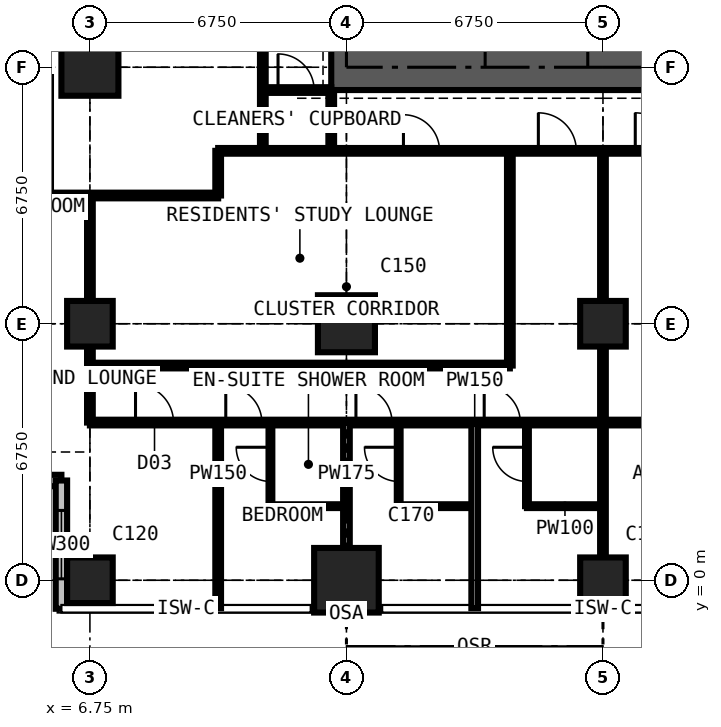
"""IFC4 building model, lengths in metres.
Left out: names, types, materials, properties, quantities, classifications, styles, units other than length and angle.
Written with IfcOpenShell. Run it as: python <this file> out.ifc"""

import sys

from ifc_helpers import new_model, si_unit, direction, frame, frame_2d, origin, origin_2d, place, context, subcontext, project, spatial, rectangle, extrude, element, fill, save


model = new_model("IFC4")
c1 = context("Model", 3, precision=1e-05, world=origin(), true_north=direction((0.0, 1.0)))
c2 = subcontext(c1, "Body", "Model", "MODEL_VIEW")
j1 = project(units=[si_unit("LENGTHUNIT", "METRE"), si_unit("PLANEANGLEUNIT", "RADIAN")], contexts=[c1])
p1 = place(None, origin())
s1 = spatial("IfcSite", under=j1, at=p1, CompositionType="ELEMENT")
p2 = place(p1, origin())
s2 = spatial("IfcBuilding", under=s1, at=p2, CompositionType="ELEMENT")
p3 = place(p2, frame((0.0, 0.0, 196.2)))
s3 = spatial("IfcBuildingStorey", under=s2, at=p3, CompositionType="ELEMENT", Elevation=196.2)
for number, where, z_axis, x_axis in (
    (1, (6.75, 0.0, 0.0), (0.0, 0.0, 1.0), (1.0, 0.0, 0.0)),
    (2, (6.75, 6.75, 0.0), (0.0, 0.0, 1.0), (1.0, 0.0, 0.0)),
):
    element("IfcColumn", number, at=place(p3, frame(where, z_axis=z_axis, x_axis=x_axis)), inside=s3, PredefinedType="COLUMN", context=c2, shape_type="SweptSolid", body=[
        extrude(rectangle(XDim=1.2, YDim=1.2, at=origin_2d()), origin(), (0.0, 0.0, 1.0), 3.6),
    ])
p4 = place(p3, frame((6.75, 13.5, 0.0), z_axis=(0.0, 0.0, 1.0), x_axis=(1.0, 0.0, 0.0)))
e3 = element("IfcColumn", 3, at=p4, inside=s3, PredefinedType="COLUMN", context=c2, shape_type="SweptSolid", body=[
    extrude(rectangle(XDim=1.5, YDim=1.5, at=origin_2d()), origin(), (0.0, 0.0, 1.0), 3.6),
])
p5 = place(p3, frame((13.5, 0.0, 0.0), z_axis=(0.0, 0.0, 1.0), x_axis=(1.0, 0.0, 0.0)))
e4 = element("IfcColumn", 4, at=p5, inside=s3, PredefinedType="COLUMN", context=c2, shape_type="SweptSolid", body=[
    extrude(rectangle(XDim=1.7, YDim=1.7, at=origin_2d()), origin(), (0.0, 0.0, 1.0), 3.6),
])
p6 = place(p3, frame((13.5, 6.75, 0.0), z_axis=(0.0, 0.0, 1.0), x_axis=(1.0, 0.0, 0.0)))
e5 = element("IfcColumn", 5, at=p6, inside=s3, PredefinedType="COLUMN", context=c2, shape_type="SweptSolid", body=[
    extrude(rectangle(XDim=1.5, YDim=1.5, at=origin_2d()), origin(), (0.0, 0.0, 1.0), 3.6),
])
for number, where, z_axis, x_axis in (
    (6, (20.25, 0.0, 0.0), (0.0, 0.0, 1.0), (1.0, 0.0, 0.0)),
    (7, (20.25, 6.75, 0.0), (0.0, 0.0, 1.0), (1.0, 0.0, 0.0)),
):
    element("IfcColumn", number, at=place(p3, frame(where, z_axis=z_axis, x_axis=x_axis)), inside=s3, PredefinedType="COLUMN", context=c2, shape_type="SweptSolid", body=[
        extrude(rectangle(XDim=1.2, YDim=1.2, at=origin_2d()), origin(), (0.0, 0.0, 1.0), 3.6),
    ])
p7 = place(p3, frame((13.1, 13.5, 0.0), z_axis=(0.0, 0.0, 1.0), x_axis=(1.0, 0.0, 0.0)))
e8 = element("IfcWall", 8, at=p7, inside=s3, PredefinedType="SHEAR", context=c2, shape_type="SweptSolid", body=[
    extrude(rectangle(XDim=14.3, YDim=1.2, at=frame_2d((7.15, 0.0))), origin(), (0.0, 0.0, 1.0), 3.6),
])
p8 = place(p3, frame((2.625, 2.625, 0.0), z_axis=(0.0, 0.0, 1.0), x_axis=(1.0, 0.0, 0.0)))
e9 = element("IfcWall", 9, at=p8, inside=s3, PredefinedType="SOLIDWALL", context=c2, shape_type="SweptSolid", body=[
    extrude(rectangle(XDim=3.375, YDim=0.3, at=frame_2d((1.688, 0.0))), origin(), (0.0, 0.0, 1.0), 3.3),
])
p9 = place(p8, frame((0.788, 0.0, 0.6)))
e10 = element("IfcOpeningElement", 10, at=p9, cuts=e9, PredefinedType="OPENING", context=c2, shape_type="SweptSolid", body=[
    extrude(rectangle(XDim=1.8, YDim=2.1, at=frame_2d((0.9, 1.05))), frame((0.0, 0.16, 0.0), z_axis=(0.0, -1.0, 0.0), x_axis=(1.0, 0.0, 0.0)), (0.0, 0.0, 1.0), 0.32),
])
p10 = place(p3, frame((6.0, 2.625, 0.0), z_axis=(0.0, 0.0, 1.0), x_axis=(0.0, -1.0, 0.0)))
e11 = element("IfcWall", 11, at=p10, inside=s3, PredefinedType="SOLIDWALL", context=c2, shape_type="SweptSolid", body=[
    extrude(rectangle(XDim=3.375, YDim=0.3, at=frame_2d((1.688, 0.0))), origin(), (0.0, 0.0, 1.0), 3.3),
])
p11 = place(p10, frame((0.788, 0.0, 0.6)))
e12 = element("IfcOpeningElement", 12, at=p11, cuts=e11, PredefinedType="OPENING", context=c2, shape_type="SweptSolid", body=[
    extrude(rectangle(XDim=1.8, YDim=2.1, at=frame_2d((0.9, 1.05))), frame((0.0, 0.16, 0.0), z_axis=(0.0, -1.0, 0.0), x_axis=(1.0, 0.0, 0.0)), (0.0, 0.0, 1.0), 0.32),
])
p12 = place(p3, frame((-0.734, 10.125, 0.0), z_axis=(0.0, 0.0, 1.0), x_axis=(1.0, 0.0, 0.0)))
e13 = element("IfcWall", 13, at=p12, inside=s3, PredefinedType="PARTITIONING", context=c2, shape_type="SweptSolid", body=[
    extrude(rectangle(XDim=10.859, YDim=0.15, at=frame_2d((5.429, 0.0))), origin(), (0.0, 0.0, 1.0), 3.3),
])
p13 = place(p3, frame((6.75, 4.15, 0.0), z_axis=(0.0, 0.0, 1.0), x_axis=(0.0, 1.0, 0.0)))
e14 = element("IfcWall", 14, at=p13, inside=s3, PredefinedType="PARTITIONING", context=c2, shape_type="SweptSolid", body=[
    extrude(rectangle(XDim=5.975, YDim=0.15, at=frame_2d((2.988, 0.0))), origin(), (0.0, 0.0, 1.0), 2.802),
])
p14 = place(p3, frame((6.75, 4.15, 0.0), z_axis=(0.0, 0.0, 1.0), x_axis=(1.0, 0.0, 0.0)))
e15 = element("IfcWall", 15, at=p14, inside=s3, PredefinedType="PARTITIONING", context=c2, shape_type="SweptSolid", body=[
    extrude(rectangle(XDim=20.25, YDim=0.15, at=frame_2d((10.125, 0.0))), origin(), (0.0, 0.0, 1.0), 3.3),
])
p15 = place(p14, frame((1.2, 0.0, 0.0)))
e16 = element("IfcOpeningElement", 16, at=p15, cuts=e15, PredefinedType="OPENING", context=c2, shape_type="SweptSolid", body=[
    extrude(rectangle(XDim=1.0, YDim=2.2, at=frame_2d((0.5, 1.1))), frame((0.0, 0.085, 0.0), z_axis=(0.0, -1.0, 0.0), x_axis=(1.0, 0.0, 0.0)), (0.0, 0.0, 1.0), 0.17),
])
p16 = place(p14, frame((3.575, 0.0, 0.0)))
e17 = element("IfcOpeningElement", 17, at=p16, cuts=e15, PredefinedType="OPENING", context=c2, shape_type="SweptSolid", body=[
    extrude(rectangle(XDim=0.95, YDim=2.2, at=frame_2d((0.475, 1.1))), frame((0.0, 0.085, 0.0), z_axis=(0.0, -1.0, 0.0), x_axis=(1.0, 0.0, 0.0)), (0.0, 0.0, 1.0), 0.17),
])
p17 = place(p14, frame((7.0, 0.0, 0.0)))
e18 = element("IfcOpeningElement", 18, at=p17, cuts=e15, PredefinedType="OPENING", context=c2, shape_type="SweptSolid", body=[
    extrude(rectangle(XDim=0.95, YDim=2.2, at=frame_2d((0.475, 1.1))), frame((0.0, 0.085, 0.0), z_axis=(0.0, -1.0, 0.0), x_axis=(1.0, 0.0, 0.0)), (0.0, 0.0, 1.0), 0.17),
])
p18 = place(p14, frame((10.375, 0.0, 0.0)))
e19 = element("IfcOpeningElement", 19, at=p18, cuts=e15, PredefinedType="OPENING", context=c2, shape_type="SweptSolid", body=[
    extrude(rectangle(XDim=0.95, YDim=2.2, at=frame_2d((0.475, 1.1))), frame((0.0, 0.085, 0.0), z_axis=(0.0, -1.0, 0.0), x_axis=(1.0, 0.0, 0.0)), (0.0, 0.0, 1.0), 0.17),
])
p19 = place(p14, frame((15.1, 0.0, 0.0)))
e20 = element("IfcOpeningElement", 20, at=p19, cuts=e15, PredefinedType="OPENING", context=c2, shape_type="SweptSolid", body=[
    extrude(rectangle(XDim=0.95, YDim=2.2, at=frame_2d((0.475, 1.1))), frame((0.0, 0.085, 0.0), z_axis=(0.0, -1.0, 0.0), x_axis=(1.0, 0.0, 0.0)), (0.0, 0.0, 1.0), 0.17),
])
p20 = place(p3, frame((6.75, 5.65, 0.0), z_axis=(0.0, 0.0, 1.0), x_axis=(1.0, 0.0, 0.0)))
e21 = element("IfcWall", 21, at=p20, inside=s3, PredefinedType="PARTITIONING", context=c2, shape_type="SweptSolid", body=[
    extrude(rectangle(XDim=11.05, YDim=0.15, at=frame_2d((5.525, 0.0))), origin(), (0.0, 0.0, 1.0), 3.3),
])
p21 = place(p3, frame((10.125, -0.734, 0.0), z_axis=(0.0, 0.0, 1.0), x_axis=(0.0, 1.0, 0.0)))
e22 = element("IfcWall", 22, at=p21, inside=s3, PredefinedType="PARTITIONING", context=c2, shape_type="SweptSolid", body=[
    extrude(rectangle(XDim=4.884, YDim=0.15, at=frame_2d((2.442, 0.0))), origin(), (0.0, 0.0, 1.0), 3.3),
])
p22 = place(p3, frame((10.125, 10.125, 0.0), z_axis=(0.0, 0.0, 1.0), x_axis=(0.0, 1.0, 0.0)))
e23 = element("IfcWall", 23, at=p22, inside=s3, PredefinedType="PARTITIONING", context=c2, shape_type="SweptSolid", body=[
    extrude(rectangle(XDim=1.175, YDim=0.15, at=frame_2d((0.587, 0.0))), origin(), (0.0, 0.0, 1.0), 3.3),
])
p23 = place(p3, frame((10.125, 11.3, 0.0), z_axis=(0.0, 0.0, 1.0), x_axis=(1.0, 0.0, 0.0)))
e24 = element("IfcWall", 24, at=p23, inside=s3, PredefinedType="PARTITIONING", context=c2, shape_type="SweptSolid", body=[
    extrude(rectangle(XDim=20.475, YDim=0.15, at=frame_2d((10.238, 0.0))), origin(), (0.0, 0.0, 1.0), 3.3),
])
p24 = place(p23, frame((8.425, 0.0, 0.0)))
e25 = element("IfcOpeningElement", 25, at=p24, cuts=e24, PredefinedType="OPENING", context=c2, shape_type="SweptSolid", body=[
    extrude(rectangle(XDim=1.0, YDim=2.2, at=frame_2d((0.5, 1.1))), frame((0.0, 0.085, 0.0), z_axis=(0.0, -1.0, 0.0), x_axis=(1.0, 0.0, 0.0)), (0.0, 0.0, 1.0), 0.17),
])
p25 = place(p23, frame((10.975, 0.0, 0.0)))
e26 = element("IfcOpeningElement", 26, at=p25, cuts=e24, PredefinedType="OPENING", context=c2, shape_type="SweptSolid", body=[
    extrude(rectangle(XDim=1.0, YDim=2.2, at=frame_2d((0.5, 1.1))), frame((0.0, 0.085, 0.0), z_axis=(0.0, -1.0, 0.0), x_axis=(1.0, 0.0, 0.0)), (0.0, 0.0, 1.0), 0.17),
])
p26 = place(p23, frame((4.875, 0.0, 0.0)))
e27 = element("IfcOpeningElement", 27, at=p26, cuts=e24, PredefinedType="OPENING", context=c2, shape_type="SweptSolid", body=[
    extrude(rectangle(XDim=0.95, YDim=2.2, at=frame_2d((0.475, 1.1))), frame((0.0, 0.085, 0.0), z_axis=(0.0, -1.0, 0.0), x_axis=(1.0, 0.0, 0.0)), (0.0, 0.0, 1.0), 0.17),
])
p27 = place(p3, frame((11.3, 11.3, 0.0), z_axis=(0.0, 0.0, 1.0), x_axis=(0.0, 1.0, 0.0)))
e28 = element("IfcWall", 28, at=p27, inside=s3, PredefinedType="PARTITIONING", context=c2, shape_type="SweptSolid", body=[
    extrude(rectangle(XDim=19.3, YDim=0.15, at=frame_2d((9.65, 0.0))), origin(), (0.0, 0.0, 1.0), 3.3),
])
p28 = place(p27, frame((18.1, 0.0, 0.0)))
e29 = element("IfcOpeningElement", 29, at=p28, cuts=e28, PredefinedType="OPENING", context=c2, shape_type="SweptSolid", body=[
    extrude(rectangle(XDim=1.0, YDim=2.2, at=frame_2d((0.5, 1.1))), frame((0.0, 0.085, 0.0), z_axis=(0.0, -1.0, 0.0), x_axis=(1.0, 0.0, 0.0)), (0.0, 0.0, 1.0), 0.17),
])
p29 = place(p27, frame((10.137, 0.0, 0.0)))
e30 = element("IfcOpeningElement", 30, at=p29, cuts=e28, PredefinedType="OPENING", context=c2, shape_type="SweptSolid", body=[
    extrude(rectangle(XDim=1.0, YDim=2.2, at=frame_2d((0.5, 1.1))), frame((0.0, 0.085, 0.0), z_axis=(0.0, -1.0, 0.0), x_axis=(1.0, 0.0, 0.0)), (0.0, 0.0, 1.0), 0.17),
])
p30 = place(p3, frame((11.3, 12.9, 0.0), z_axis=(0.0, 0.0, 1.0), x_axis=(1.0, 0.0, 0.0)))
e31 = element("IfcWall", 31, at=p30, inside=s3, PredefinedType="PARTITIONING", context=c2, shape_type="SweptSolid", body=[
    extrude(rectangle(XDim=1.8, YDim=0.15, at=frame_2d((0.9, 0.0))), origin(), (0.0, 0.0, 1.0), 2.802),
])
p31 = place(p30, frame((0.4, 0.0, 0.0)))
e32 = element("IfcOpeningElement", 32, at=p31, cuts=e31, PredefinedType="OPENING", context=c2, shape_type="SweptSolid", body=[
    extrude(rectangle(XDim=0.95, YDim=2.2, at=frame_2d((0.475, 1.1))), frame((0.0, 0.085, 0.0), z_axis=(0.0, -1.0, 0.0), x_axis=(1.0, 0.0, 0.0)), (0.0, 0.0, 1.0), 0.17),
])
p32 = place(p3, frame((11.5, 1.95, 0.0), z_axis=(0.0, 0.0, 1.0), x_axis=(0.0, 1.0, 0.0)))
e33 = element("IfcWall", 33, at=p32, inside=s3, PredefinedType="PARTITIONING", context=c2, shape_type="SweptSolid", body=[
    extrude(rectangle(XDim=2.2, YDim=0.1, at=frame_2d((1.1, 0.0))), origin(), (0.0, 0.0, 1.0), 3.3),
])
p33 = place(p32, frame((0.65, 0.0, 0.0)))
e34 = element("IfcOpeningElement", 34, at=p33, cuts=e33, PredefinedType="OPENING", context=c2, shape_type="SweptSolid", body=[
    extrude(rectangle(XDim=0.9, YDim=2.2, at=frame_2d((0.45, 1.1))), frame((0.0, 0.06, 0.0), z_axis=(0.0, -1.0, 0.0), x_axis=(1.0, 0.0, 0.0)), (0.0, 0.0, 1.0), 0.12),
])
p34 = place(p3, frame((11.5, 1.95, 0.0), z_axis=(0.0, 0.0, 1.0), x_axis=(1.0, 0.0, 0.0)))
e35 = element("IfcWall", 35, at=p34, inside=s3, PredefinedType="PARTITIONING", context=c2, shape_type="SweptSolid", body=[
    extrude(rectangle(XDim=2.0, YDim=0.1, at=frame_2d((1.0, 0.0))), origin(), (0.0, 0.0, 1.0), 3.3),
])
p35 = place(p3, frame((13.1, 11.3, 0.0), z_axis=(0.0, 0.0, 1.0), x_axis=(0.0, 1.0, 0.0)))
e36 = element("IfcWall", 36, at=p35, inside=s3, PredefinedType="PARTITIONING", context=c2, shape_type="SweptSolid", body=[
    extrude(rectangle(XDim=1.6, YDim=0.15, at=frame_2d((0.8, 0.0))), origin(), (0.0, 0.0, 1.0), 3.3),
])
p36 = place(p3, frame((13.5, -0.734, 0.0), z_axis=(0.0, 0.0, 1.0), x_axis=(0.0, 1.0, 0.0)))
e37 = element("IfcWall", 37, at=p36, inside=s3, PredefinedType="PARTITIONING", context=c2, shape_type="SweptSolid", body=[
    extrude(rectangle(XDim=4.884, YDim=0.175, at=frame_2d((2.442, 0.0))), origin(), (0.0, 0.0, 1.0), 2.802),
])
p37 = place(p3, frame((14.875, 1.95, 0.0), z_axis=(0.0, 0.0, 1.0), x_axis=(0.0, 1.0, 0.0)))
e38 = element("IfcWall", 38, at=p37, inside=s3, PredefinedType="PARTITIONING", context=c2, shape_type="SweptSolid", body=[
    extrude(rectangle(XDim=2.2, YDim=0.1, at=frame_2d((1.1, 0.0))), origin(), (0.0, 0.0, 1.0), 3.3),
])
p38 = place(p37, frame((0.65, 0.0, 0.0)))
e39 = element("IfcOpeningElement", 39, at=p38, cuts=e38, PredefinedType="OPENING", context=c2, shape_type="SweptSolid", body=[
    extrude(rectangle(XDim=0.9, YDim=2.2, at=frame_2d((0.45, 1.1))), frame((0.0, 0.06, 0.0), z_axis=(0.0, -1.0, 0.0), x_axis=(1.0, 0.0, 0.0)), (0.0, 0.0, 1.0), 0.12),
])
p39 = place(p3, frame((14.875, 1.95, 0.0), z_axis=(0.0, 0.0, 1.0), x_axis=(1.0, 0.0, 0.0)))
e40 = element("IfcWall", 40, at=p39, inside=s3, PredefinedType="PARTITIONING", context=c2, shape_type="SweptSolid", body=[
    extrude(rectangle(XDim=2.0, YDim=0.1, at=frame_2d((1.0, 0.0))), origin(), (0.0, 0.0, 1.0), 3.3),
])
p40 = place(p3, frame((16.875, -0.734, 0.0), z_axis=(0.0, 0.0, 1.0), x_axis=(0.0, 1.0, 0.0)))
e41 = element("IfcWall", 41, at=p40, inside=s3, PredefinedType="PARTITIONING", context=c2, shape_type="SweptSolid", body=[
    extrude(rectangle(XDim=4.884, YDim=0.175, at=frame_2d((2.442, 0.0))), origin(), (0.0, 0.0, 1.0), 3.3),
])
p41 = place(p3, frame((17.8, 5.65, 0.0), z_axis=(0.0, 0.0, 1.0), x_axis=(0.0, 1.0, 0.0)))
e42 = element("IfcWall", 42, at=p41, inside=s3, PredefinedType="PARTITIONING", context=c2, shape_type="SweptSolid", body=[
    extrude(rectangle(XDim=5.65, YDim=0.15, at=frame_2d((2.825, 0.0))), origin(), (0.0, 0.0, 1.0), 3.3),
])
p42 = place(p3, frame((18.25, 1.95, 0.0), z_axis=(0.0, 0.0, 1.0), x_axis=(0.0, 1.0, 0.0)))
e43 = element("IfcWall", 43, at=p42, inside=s3, PredefinedType="PARTITIONING", context=c2, shape_type="SweptSolid", body=[
    extrude(rectangle(XDim=2.2, YDim=0.1, at=frame_2d((1.1, 0.0))), origin(), (0.0, 0.0, 1.0), 3.3),
])
p43 = place(p42, frame((0.65, 0.0, 0.0)))
e44 = element("IfcOpeningElement", 44, at=p43, cuts=e43, PredefinedType="OPENING", context=c2, shape_type="SweptSolid", body=[
    extrude(rectangle(XDim=0.9, YDim=2.2, at=frame_2d((0.45, 1.1))), frame((0.0, 0.06, 0.0), z_axis=(0.0, -1.0, 0.0), x_axis=(1.0, 0.0, 0.0)), (0.0, 0.0, 1.0), 0.12),
])
p44 = place(p3, frame((18.25, 1.95, 0.0), z_axis=(0.0, 0.0, 1.0), x_axis=(1.0, 0.0, 0.0)))
e45 = element("IfcWall", 45, at=p44, inside=s3, PredefinedType="PARTITIONING", context=c2, shape_type="SweptSolid", body=[
    extrude(rectangle(XDim=2.0, YDim=0.1, at=frame_2d((1.0, 0.0))), origin(), (0.0, 0.0, 1.0), 3.3),
])
p45 = place(p3, frame((20.25, -0.734, 0.0), z_axis=(0.0, 0.0, 1.0), x_axis=(0.0, 1.0, 0.0)))
e46 = element("IfcWall", 46, at=p45, inside=s3, PredefinedType="PARTITIONING", context=c2, shape_type="SweptSolid", body=[
    extrude(rectangle(XDim=12.034, YDim=0.15, at=frame_2d((6.017, 0.0))), origin(), (0.0, 0.0, 1.0), 2.802),
])
p46 = place(p11, origin())
e47 = element("IfcWindow", 47, at=p46, inside=s3, PartitioningType="SINGLE_PANEL", PredefinedType="WINDOW", context=c2, shape_type="SweptSolid", body=[
    extrude(rectangle(XDim=1.8, YDim=2.1, at=frame_2d((0.9, 1.05))), frame((0.0, 0.03, 0.0), z_axis=(0.0, -1.0, 0.0), x_axis=(1.0, 0.0, 0.0)), (0.0, 0.0, 1.0), 0.06),
])
fill(e12, e47)
p47 = place(p31, origin())
e48 = element("IfcDoor", 48, at=p47, inside=s3, OperationType="SINGLE_SWING_LEFT", PredefinedType="DOOR", context=c2, shape_type="SweptSolid", body=[
    extrude(rectangle(XDim=0.95, YDim=2.2, at=frame_2d((0.475, 1.1))), frame((0.0, 0.025, 0.0), z_axis=(0.0, -1.0, 0.0), x_axis=(1.0, 0.0, 0.0)), (0.0, 0.0, 1.0), 0.05),
])
fill(e32, e48)
p48 = place(p15, origin())
e49 = element("IfcDoor", 49, at=p48, inside=s3, OperationType="SINGLE_SWING_LEFT", PredefinedType="DOOR", context=c2, shape_type="SweptSolid", body=[
    extrude(rectangle(XDim=1.0, YDim=2.2, at=frame_2d((0.5, 1.1))), frame((0.0, 0.025, 0.0), z_axis=(0.0, -1.0, 0.0), x_axis=(1.0, 0.0, 0.0)), (0.0, 0.0, 1.0), 0.05),
])
fill(e16, e49)
p49 = place(p16, origin())
e50 = element("IfcDoor", 50, at=p49, inside=s3, OperationType="SINGLE_SWING_LEFT", PredefinedType="DOOR", context=c2, shape_type="SweptSolid", body=[
    extrude(rectangle(XDim=0.95, YDim=2.2, at=frame_2d((0.475, 1.1))), frame((0.0, 0.025, 0.0), z_axis=(0.0, -1.0, 0.0), x_axis=(1.0, 0.0, 0.0)), (0.0, 0.0, 1.0), 0.05),
])
fill(e17, e50)
p50 = place(p33, origin())
e51 = element("IfcDoor", 51, at=p50, inside=s3, OperationType="SINGLE_SWING_RIGHT", PredefinedType="DOOR", context=c2, shape_type="SweptSolid", body=[
    extrude(rectangle(XDim=0.9, YDim=2.2, at=frame_2d((0.45, 1.1))), frame((0.0, 0.025, 0.0), z_axis=(0.0, -1.0, 0.0), x_axis=(1.0, 0.0, 0.0)), (0.0, 0.0, 1.0), 0.05),
])
fill(e34, e51)
p51 = place(p17, origin())
e52 = element("IfcDoor", 52, at=p51, inside=s3, OperationType="SINGLE_SWING_LEFT", PredefinedType="DOOR", context=c2, shape_type="SweptSolid", body=[
    extrude(rectangle(XDim=0.95, YDim=2.2, at=frame_2d((0.475, 1.1))), frame((0.0, 0.025, 0.0), z_axis=(0.0, -1.0, 0.0), x_axis=(1.0, 0.0, 0.0)), (0.0, 0.0, 1.0), 0.05),
])
fill(e18, e52)
p52 = place(p38, origin())
e53 = element("IfcDoor", 53, at=p52, inside=s3, OperationType="SINGLE_SWING_RIGHT", PredefinedType="DOOR", context=c2, shape_type="SweptSolid", body=[
    extrude(rectangle(XDim=0.9, YDim=2.2, at=frame_2d((0.45, 1.1))), frame((0.0, 0.025, 0.0), z_axis=(0.0, -1.0, 0.0), x_axis=(1.0, 0.0, 0.0)), (0.0, 0.0, 1.0), 0.05),
])
fill(e39, e53)
p53 = place(p18, origin())
e54 = element("IfcDoor", 54, at=p53, inside=s3, OperationType="SINGLE_SWING_LEFT", PredefinedType="DOOR", context=c2, shape_type="SweptSolid", body=[
    extrude(rectangle(XDim=0.95, YDim=2.2, at=frame_2d((0.475, 1.1))), frame((0.0, 0.025, 0.0), z_axis=(0.0, -1.0, 0.0), x_axis=(1.0, 0.0, 0.0)), (0.0, 0.0, 1.0), 0.05),
])
fill(e19, e54)
p54 = place(p43, origin())
e55 = element("IfcDoor", 55, at=p54, inside=s3, OperationType="SINGLE_SWING_RIGHT", PredefinedType="DOOR", context=c2, shape_type="SweptSolid", body=[
    extrude(rectangle(XDim=0.9, YDim=2.2, at=frame_2d((0.45, 1.1))), frame((0.0, 0.025, 0.0), z_axis=(0.0, -1.0, 0.0), x_axis=(1.0, 0.0, 0.0)), (0.0, 0.0, 1.0), 0.05),
])
fill(e44, e55)
p55 = place(p24, origin())
e56 = element("IfcDoor", 56, at=p55, inside=s3, OperationType="SINGLE_SWING_LEFT", PredefinedType="DOOR", context=c2, shape_type="SweptSolid", body=[
    extrude(rectangle(XDim=1.0, YDim=2.2, at=frame_2d((0.5, 1.1))), frame((0.0, 0.025, 0.0), z_axis=(0.0, -1.0, 0.0), x_axis=(1.0, 0.0, 0.0)), (0.0, 0.0, 1.0), 0.05),
])
fill(e25, e56)
p56 = place(p25, origin())
e57 = element("IfcDoor", 57, at=p56, inside=s3, OperationType="SINGLE_SWING_LEFT", PredefinedType="DOOR", context=c2, shape_type="SweptSolid", body=[
    extrude(rectangle(XDim=1.0, YDim=2.2, at=frame_2d((0.5, 1.1))), frame((0.0, 0.025, 0.0), z_axis=(0.0, -1.0, 0.0), x_axis=(1.0, 0.0, 0.0)), (0.0, 0.0, 1.0), 0.05),
])
fill(e26, e57)
p57 = place(p26, origin())
e58 = element("IfcDoor", 58, at=p57, inside=s3, OperationType="SINGLE_SWING_LEFT", PredefinedType="DOOR", context=c2, shape_type="SweptSolid", body=[
    extrude(rectangle(XDim=0.95, YDim=2.2, at=frame_2d((0.475, 1.1))), frame((0.0, 0.025, 0.0), z_axis=(0.0, -1.0, 0.0), x_axis=(1.0, 0.0, 0.0)), (0.0, 0.0, 1.0), 0.05),
])
fill(e27, e58)
save(model, sys.argv[1])
